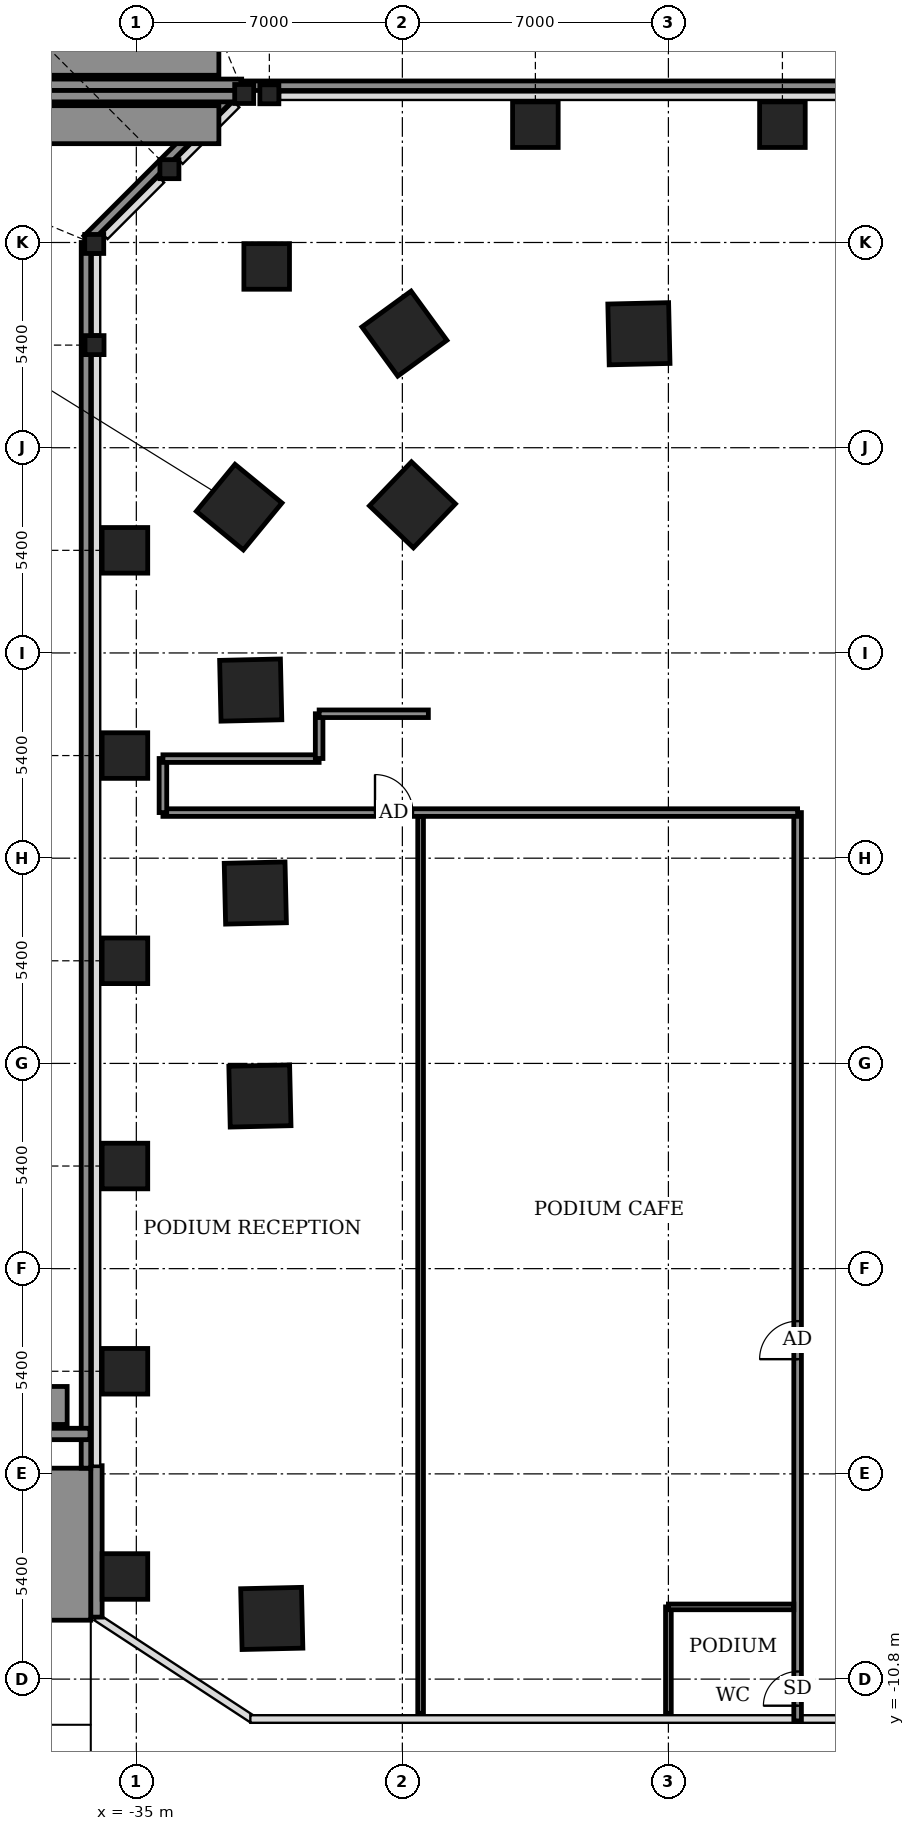
"""IFC4 building model, lengths in metres.
Left out: names, types, materials, properties, quantities, classifications, styles, units other than length and angle.
Written with IfcOpenShell. Run it as: python <this file> out.ifc"""

import sys

from ifc_helpers import new_model, si_unit, direction, frame, frame_2d, origin, origin_2d, place, context, subcontext, project, spatial, rectangle, extrude, element, fill, save


model = new_model("IFC4")
c1 = context("Model", 3, precision=1e-05, world=origin(), true_north=direction((0.0, 1.0)))
c2 = subcontext(c1, "Body", "Model", "MODEL_VIEW")
j1 = project(units=[si_unit("LENGTHUNIT", "METRE"), si_unit("PLANEANGLEUNIT", "RADIAN")], contexts=[c1])
p1 = place(None, origin())
s1 = spatial("IfcSite", under=j1, at=p1, CompositionType="ELEMENT")
p2 = place(p1, origin())
s2 = spatial("IfcBuilding", under=s1, at=p2, CompositionType="ELEMENT")
p3 = place(p2, origin())
s3 = spatial("IfcBuildingStorey", under=s2, at=p3, CompositionType="ELEMENT", Elevation=0.0)
for number, where, z_axis, x_axis in (
    (1, (-31.436, -9.204, -0.3), (0.0, 0.0, 1.0), (0.023, -1.0, 0.0)),
    (2, (-21.776, 24.599, -0.3), (0.0, 0.0, 1.0), (-1.0, -0.023, 0.0)),
    (3, (-27.946, 24.602, -0.3), (0.0, 0.0, 1.0), (-0.808, -0.589, 0.0)),
    (4, (-27.735, 20.097, -0.3), (0.0, 0.0, 1.0), (-0.691, -0.723, 0.0)),
    (5, (-32.294, 20.037, -0.3), (0.0, 0.0, 1.0), (-0.635, -0.772, 0.0)),
    (6, (-31.99, 15.223, -0.3), (0.0, 0.0, 1.0), (0.023, -1.0, 0.0)),
    (7, (-31.869, 9.883, -0.3), (0.0, 0.0, 1.0), (0.023, -1.0, 0.0)),
    (8, (-31.748, 4.543, -0.3), (0.0, 0.0, 1.0), (0.023, -1.0, 0.0)),
):
    element("IfcColumn", number, at=place(p3, frame(where, z_axis=z_axis, x_axis=x_axis)), inside=s3, PredefinedType="COLUMN", context=c2, shape_type="SweptSolid", body=[
        extrude(rectangle(XDim=1.6, YDim=1.6, at=origin_2d()), origin(), (0.0, 0.0, 1.0), 5.75),
    ])
for number, where, z_axis, x_axis in (
    (9, (-24.5, 30.1, -0.3), (0.0, 0.0, 1.0), (1.0, 0.0, 0.0)),
    (10, (-18.0, 30.1, -0.3), (0.0, 0.0, 1.0), (1.0, 0.0, 0.0)),
    (11, (-35.3, -8.1, -0.3), (0.0, 0.0, 1.0), (1.0, 0.0, 0.0)),
    (12, (-35.3, -2.7, -0.3), (0.0, 0.0, 1.0), (1.0, 0.0, 0.0)),
    (13, (-35.3, 2.7, -0.3), (0.0, 0.0, 1.0), (1.0, 0.0, 0.0)),
    (14, (-35.3, 8.1, -0.3), (0.0, 0.0, 1.0), (1.0, 0.0, 0.0)),
    (15, (-35.3, 13.5, -0.3), (0.0, 0.0, 1.0), (1.0, 0.0, 0.0)),
    (16, (-35.3, 18.9, -0.3), (0.0, 0.0, 1.0), (1.0, 0.0, 0.0)),
    (17, (-31.57, 26.37, -0.3), (0.0, 0.0, 1.0), (1.0, 0.0, 0.0)),
):
    element("IfcColumn", number, at=place(p3, frame(where, z_axis=z_axis, x_axis=x_axis)), inside=s3, PredefinedType="COLUMN", context=c2, shape_type="SweptSolid", body=[
        extrude(rectangle(XDim=1.2, YDim=1.2, at=origin_2d()), origin(), (0.0, 0.0, 1.0), 5.75),
    ])
for number, where, z_axis, x_axis in (
    (18, (-34.129, 28.929, -0.3), (0.0, 0.0, 1.0), (1.0, 0.0, 0.0)),
    (19, (-32.162, 30.908, -0.3), (0.0, 0.0, 1.0), (1.0, 0.0, 0.0)),
    (20, (-31.5, 30.9, -0.3), (0.0, 0.0, 1.0), (1.0, 0.0, 0.0)),
    (21, (-36.1, 24.3, -0.3), (0.0, 0.0, 1.0), (1.0, 0.0, 0.0)),
    (22, (-36.108, 26.962, -0.3), (0.0, 0.0, 1.0), (1.0, 0.0, 0.0)),
):
    element("IfcColumn", number, at=place(p3, frame(where, z_axis=z_axis, x_axis=x_axis)), inside=s3, PredefinedType="COLUMN", context=c2, shape_type="SweptSolid", body=[
        extrude(rectangle(XDim=0.5, YDim=0.5, at=origin_2d()), origin(), (0.0, 0.0, 1.0), 5.38),
    ])
p4 = place(p3, frame((-36.05, -5.185, 0.0), z_axis=(0.0, 0.0, 1.0), x_axis=(0.0, -1.0, 0.0)))
e23 = element("IfcWall", 23, at=p4, inside=s3, PredefinedType="SOLIDWALL", context=c2, shape_type="SweptSolid", body=[
    extrude(rectangle(XDim=3.984, YDim=0.3, at=frame_2d((1.992, 0.0))), origin(), (0.0, 0.0, 1.0), 5.45),
])
p5 = place(p3, frame((-37.45, -9.25, 0.0), z_axis=(0.0, 0.0, 1.0), x_axis=(0.0, 1.0, 0.0)))
e24 = element("IfcWall", 24, at=p5, inside=s3, PredefinedType="STANDARD", context=c2, shape_type="SweptSolid", body=[
    extrude(rectangle(XDim=4.0, YDim=2.5, at=frame_2d((2.0, 0.0))), origin(), (0.0, 0.0, 1.0), 6.0),
])
p6 = place(p3, frame((-2.9, 31.125, 0.0), z_axis=(0.0, 0.0, 1.0), x_axis=(-1.0, 0.0, 0.0)))
e25 = element("IfcWall", 25, at=p6, inside=s3, PredefinedType="STANDARD", context=c2, shape_type="SweptSolid", body=[
    extrude(rectangle(XDim=29.3, YDim=0.25, at=frame_2d((14.65, 0.0))), origin(), (0.0, 0.0, 1.0), 0.9),
])
p7 = place(p3, frame((-32.288, 31.088, 0.0), z_axis=(0.0, 0.0, 1.0), x_axis=(-0.707106781187, -0.707106781187, 0.0)))
e26 = element("IfcWall", 26, at=p7, inside=s3, PredefinedType="STANDARD", context=c2, shape_type="SweptSolid", body=[
    extrude(rectangle(XDim=5.657, YDim=0.25, at=frame_2d((2.828, 0.0))), origin(), (0.0, 0.0, 1.0), 0.9),
])
p8 = place(p3, frame((-36.325, 27.0, 0.0), z_axis=(0.0, 0.0, 1.0), x_axis=(0.0, -1.0, 0.0)))
e27 = element("IfcWall", 27, at=p8, inside=s3, PredefinedType="STANDARD", context=c2, shape_type="SweptSolid", body=[
    extrude(rectangle(XDim=32.25, YDim=0.25, at=frame_2d((16.125, 0.0))), origin(), (0.0, 0.0, 1.0), 0.9),
])
p9 = place(p3, frame((-34.786, 37.394, 5.5), z_axis=(0.0, 0.0, 1.0), x_axis=(-0.707106781187, -0.707106781187, 0.0)))
e28 = element("IfcWall", 28, at=p9, inside=s3, PredefinedType="PARAPET", context=c2, shape_type="SweptSolid", body=[
    extrude(rectangle(XDim=8.468, YDim=0.3, at=frame_2d((4.234, 0.0))), origin(), (0.0, 0.0, 1.0), 1.15),
])
p10 = place(p3, frame((-35.033, 36.086, 5.5), z_axis=(0.0, 0.0, 1.0), x_axis=(-0.707106781187, -0.707106781187, 0.0)))
e29 = element("IfcWall", 29, at=p10, inside=s3, PredefinedType="SOLIDWALL", context=c2, shape_type="SweptSolid", body=[
    extrude(rectangle(XDim=5.918, YDim=1.0, at=frame_2d((2.959, 0.0))), origin(), (0.0, 0.0, 1.0), 0.3),
])
p11 = place(p3, frame((-40.668, 31.15, 5.5), z_axis=(0.0, 0.0, 1.0), x_axis=(1.0, 0.0, 0.0)))
e30 = element("IfcWall", 30, at=p11, inside=s3, PredefinedType="PARAPET", context=c2, shape_type="SweptSolid", body=[
    extrude(rectangle(XDim=8.44, YDim=0.3, at=frame_2d((4.22, 0.0))), origin(), (0.0, 0.0, 1.0), 1.15),
])
p12 = place(p3, frame((-38.368, 31.9, 5.5), z_axis=(0.0, 0.0, 1.0), x_axis=(1.0, 0.0, 0.0)))
e31 = element("IfcWall", 31, at=p12, inside=s3, PredefinedType="SOLIDWALL", context=c2, shape_type="SweptSolid", body=[
    extrude(rectangle(XDim=5.54, YDim=1.0, at=frame_2d((2.77, 0.0))), origin(), (0.0, 0.0, 1.0), 0.3),
])
p13 = place(p3, frame((-32.228, 30.85, 5.5), z_axis=(0.0, 0.0, 1.0), x_axis=(-1.0, 0.0, 0.0)))
e32 = element("IfcWall", 32, at=p13, inside=s3, PredefinedType="PARAPET", context=c2, shape_type="SweptSolid", body=[
    extrude(rectangle(XDim=9.164, YDim=0.3, at=frame_2d((4.582, 0.0))), origin(), (0.0, 0.0, 1.0), 1.15),
])
p14 = place(p3, frame((-32.828, 30.1, 5.5), z_axis=(0.0, 0.0, 1.0), x_axis=(-1.0, 0.0, 0.0)))
e33 = element("IfcWall", 33, at=p14, inside=s3, PredefinedType="SOLIDWALL", context=c2, shape_type="SweptSolid", body=[
    extrude(rectangle(XDim=7.964, YDim=1.0, at=frame_2d((3.982, 0.0))), origin(), (0.0, 0.0, 1.0), 0.3),
])
p15 = place(p3, frame((-42.4, -4.35, 5.5), z_axis=(0.0, 0.0, 1.0), x_axis=(1.0, 0.0, 0.0)))
e34 = element("IfcWall", 34, at=p15, inside=s3, PredefinedType="PARAPET", context=c2, shape_type="SweptSolid", body=[
    extrude(rectangle(XDim=6.18, YDim=0.3, at=frame_2d((3.09, 0.0))), origin(), (0.0, 0.0, 1.0), 1.15),
])
p16 = place(p3, frame((-41.0, -3.6, 5.5), z_axis=(0.0, 0.0, 1.0), x_axis=(1.0, 0.0, 0.0)))
e35 = element("IfcWall", 35, at=p16, inside=s3, PredefinedType="SOLIDWALL", context=c2, shape_type="SweptSolid", body=[
    extrude(rectangle(XDim=4.18, YDim=1.0, at=frame_2d((2.09, 0.0))), origin(), (0.0, 0.0, 1.0), 0.3),
])
p17 = place(p3, frame((-27.52, -11.7, 0.0), z_axis=(0.0, 0.0, 1.0), x_axis=(0.0, 1.0, 0.0)))
e36 = element("IfcWall", 36, at=p17, inside=s3, PredefinedType="PARTITIONING", context=c2, shape_type="SweptSolid", body=[
    extrude(rectangle(XDim=23.6, YDim=0.15, at=frame_2d((11.8, 0.0))), origin(), (0.0, 0.0, 1.0), 5.45),
])
p18 = place(p3, frame((-21.0, -11.7, 0.0), z_axis=(0.0, 0.0, 1.0), x_axis=(0.0, 1.0, 0.0)))
e37 = element("IfcWall", 37, at=p18, inside=s3, PredefinedType="PARTITIONING", context=c2, shape_type="SweptSolid", body=[
    extrude(rectangle(XDim=2.8, YDim=0.15, at=frame_2d((1.4, 0.0))), origin(), (0.0, 0.0, 1.0), 5.45),
])
p19 = place(p3, frame((-17.6, -11.9, 0.0), z_axis=(0.0, 0.0, 1.0), x_axis=(0.0, 1.0, 0.0)))
e38 = element("IfcWall", 38, at=p19, inside=s3, PredefinedType="PARTITIONING", context=c2, shape_type="SweptSolid", body=[
    extrude(rectangle(XDim=23.9, YDim=0.2, at=frame_2d((11.95, 0.0))), origin(), (0.0, 0.0, 1.0), 4.49),
])
p20 = place(p19, frame((9.518, 0.0, 0.0)))
e39 = element("IfcOpeningElement", 39, at=p20, cuts=e38, PredefinedType="OPENING", context=c2, shape_type="SweptSolid", body=[
    extrude(rectangle(XDim=1.0, YDim=2.1, at=frame_2d((0.5, 1.05))), frame((0.0, 0.11, 0.0), z_axis=(0.0, -1.0, 0.0), x_axis=(1.0, 0.0, 0.0)), (0.0, 0.0, 1.0), 0.22),
])
p21 = place(p19, frame((0.4, 0.0, 0.0)))
e40 = element("IfcOpeningElement", 40, at=p21, cuts=e38, PredefinedType="OPENING", context=c2, shape_type="SweptSolid", body=[
    extrude(rectangle(XDim=0.9, YDim=2.1, at=frame_2d((0.45, 1.05))), frame((0.0, 0.11, 0.0), z_axis=(0.0, -1.0, 0.0), x_axis=(1.0, 0.0, 0.0)), (0.0, 0.0, 1.0), 0.22),
])
p22 = place(p3, frame((-21.0, -8.9, 0.0), z_axis=(0.0, 0.0, 1.0), x_axis=(1.0, 0.0, 0.0)))
e41 = element("IfcWall", 41, at=p22, inside=s3, PredefinedType="PARTITIONING", context=c2, shape_type="SweptSolid", body=[
    extrude(rectangle(XDim=3.3, YDim=0.15, at=frame_2d((1.65, 0.0))), origin(), (0.0, 0.0, 1.0), 5.45),
])
p23 = place(p3, frame((-34.3, 12.0, 0.0), z_axis=(0.0, 0.0, 1.0), x_axis=(1.0, 0.0, 0.0)))
e42 = element("IfcWall", 42, at=p23, inside=s3, PredefinedType="PARTITIONING", context=c2, shape_type="SweptSolid", body=[
    extrude(rectangle(XDim=16.7, YDim=0.2, at=frame_2d((8.35, 0.0))), origin(), (0.0, 0.0, 1.0), 5.45),
])
p24 = place(p23, frame((5.58, 0.0, 0.0)))
e43 = element("IfcOpeningElement", 43, at=p24, cuts=e42, PredefinedType="OPENING", context=c2, shape_type="SweptSolid", body=[
    extrude(rectangle(XDim=1.0, YDim=2.1, at=frame_2d((0.5, 1.05))), frame((0.0, 0.11, 0.0), z_axis=(0.0, -1.0, 0.0), x_axis=(1.0, 0.0, 0.0)), (0.0, 0.0, 1.0), 0.22),
])
p25 = place(p3, frame((-34.3, 12.0, 0.0), z_axis=(0.0, 0.0, 1.0), x_axis=(0.0, 1.0, 0.0)))
e44 = element("IfcWall", 44, at=p25, inside=s3, PredefinedType="PARTITIONING", context=c2, shape_type="SweptSolid", body=[
    extrude(rectangle(XDim=1.423, YDim=0.2, at=frame_2d((0.711, 0.0))), origin(), (0.0, 0.0, 1.0), 5.45),
])
p26 = place(p3, frame((-34.3, 13.42, 0.0), z_axis=(0.0, 0.0, 1.0), x_axis=(1.0, 0.0, 0.0)))
e45 = element("IfcWall", 45, at=p26, inside=s3, PredefinedType="PARTITIONING", context=c2, shape_type="SweptSolid", body=[
    extrude(rectangle(XDim=4.11, YDim=0.2, at=frame_2d((2.055, 0.0))), origin(), (0.0, 0.0, 1.0), 5.45),
])
p27 = place(p3, frame((-30.19, 13.423, 0.0), z_axis=(0.0, 0.0, 1.0), x_axis=(0.0, 1.0, 0.0)))
e46 = element("IfcWall", 46, at=p27, inside=s3, PredefinedType="PARTITIONING", context=c2, shape_type="SweptSolid", body=[
    extrude(rectangle(XDim=1.177, YDim=0.2, at=frame_2d((0.588, 0.0))), origin(), (0.0, 0.0, 1.0), 5.45),
])
p28 = place(p3, frame((-30.19, 14.6, 0.0), z_axis=(0.0, 0.0, 1.0), x_axis=(1.0, 0.0, 0.0)))
e47 = element("IfcWall", 47, at=p28, inside=s3, PredefinedType="PARTITIONING", context=c2, shape_type="SweptSolid", body=[
    extrude(rectangle(XDim=2.874, YDim=0.2, at=frame_2d((1.437, 0.0))), origin(), (0.0, 0.0, 1.0), 5.45),
])
p29 = place(p20, origin())
e48 = element("IfcDoor", 48, at=p29, inside=s3, OperationType="SINGLE_SWING_LEFT", PredefinedType="DOOR", context=c2, shape_type="SweptSolid", body=[
    extrude(rectangle(XDim=1.0, YDim=2.1, at=frame_2d((0.5, 1.05))), frame((0.0, 0.025, 0.0), z_axis=(0.0, -1.0, 0.0), x_axis=(1.0, 0.0, 0.0)), (0.0, 0.0, 1.0), 0.05),
])
fill(e39, e48)
p30 = place(p21, origin())
e49 = element("IfcDoor", 49, at=p30, inside=s3, OperationType="SINGLE_SWING_LEFT", PredefinedType="DOOR", context=c2, shape_type="SweptSolid", body=[
    extrude(rectangle(XDim=0.9, YDim=2.1, at=frame_2d((0.45, 1.05))), frame((0.0, 0.025, 0.0), z_axis=(0.0, -1.0, 0.0), x_axis=(1.0, 0.0, 0.0)), (0.0, 0.0, 1.0), 0.05),
])
fill(e40, e49)
p31 = place(p24, origin())
e50 = element("IfcDoor", 50, at=p31, inside=s3, OperationType="SINGLE_SWING_RIGHT", PredefinedType="DOOR", context=c2, shape_type="SweptSolid", body=[
    extrude(rectangle(XDim=1.0, YDim=2.1, at=frame_2d((0.5, 1.05))), frame((0.0, 0.025, 0.0), z_axis=(0.0, -1.0, 0.0), x_axis=(1.0, 0.0, 0.0)), (0.0, 0.0, 1.0), 0.05),
])
fill(e43, e50)
save(model, sys.argv[1])
